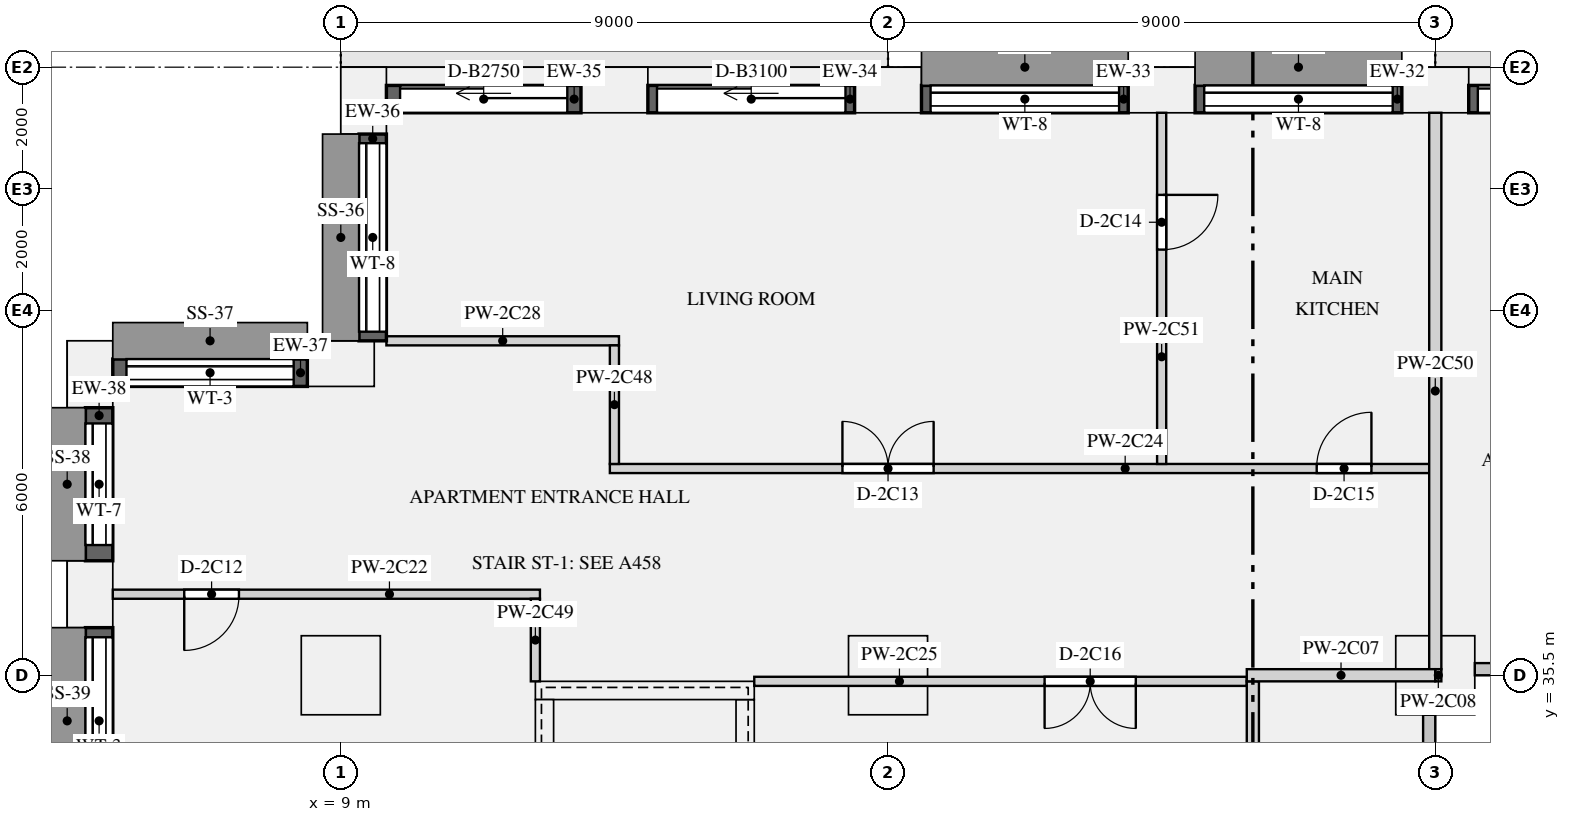
"""IFC4 building model, lengths in metres.
Left out: names, types, materials, properties, quantities, classifications, styles, units other than length and angle.
Written with IfcOpenShell. Run it as: python <this file> out.ifc"""

import sys

from ifc_helpers import new_model, si_unit, direction, frame, frame_2d, origin, origin_2d, place, context, subcontext, project, spatial, rectangle, extrude, element, fill, save


model = new_model("IFC4")
c1 = context("Model", 3, precision=1e-05, world=origin(), true_north=direction((0.0, 1.0)))
c2 = subcontext(c1, "Body", "Model", "MODEL_VIEW")
j1 = project(units=[si_unit("LENGTHUNIT", "METRE"), si_unit("PLANEANGLEUNIT", "RADIAN")], contexts=[c1])
p1 = place(None, origin())
s1 = spatial("IfcSite", under=j1, at=p1, CompositionType="ELEMENT")
p2 = place(p1, origin())
s2 = spatial("IfcBuilding", under=s1, at=p2, CompositionType="ELEMENT")
p3 = place(p2, frame((0.0, 0.0, 102.45)))
s3 = spatial("IfcBuildingStorey", under=s2, at=p3, CompositionType="ELEMENT", Elevation=102.45)
for number, where, z_axis, x_axis in (
    (1, (27.0, 45.125, 0.0), (0.0, 0.0, 1.0), (-1.0, 0.0, 0.0)),
    (2, (22.5, 45.125, 0.0), (0.0, 0.0, 1.0), (-1.0, 0.0, 0.0)),
    (3, (18.0, 45.125, 0.0), (0.0, 0.0, 1.0), (-1.0, 0.0, 0.0)),
    (4, (13.5, 45.125, 0.0), (0.0, 0.0, 1.0), (-1.0, 0.0, 0.0)),
    (5, (9.375, 44.95, 0.0), (0.0, 0.0, 1.0), (0.0, -1.0, 0.0)),
    (6, (9.0, 40.625, 0.0), (0.0, 0.0, 1.0), (-1.0, 0.0, 0.0)),
    (7, (4.875, 40.45, 0.0), (0.0, 0.0, 1.0), (0.0, -1.0, 0.0)),
    (8, (4.875, 36.833, 0.0), (0.0, 0.0, 1.0), (0.0, -1.0, 0.0)),
):
    element("IfcColumn", number, at=place(p3, frame(where, z_axis=z_axis, x_axis=x_axis)), inside=s3, PredefinedType="USERDEFINED", context=c2, shape_type="SweptSolid", body=[
        extrude(rectangle(XDim=1.1, YDim=0.75, at=origin_2d()), origin(), (0.0, 0.0, 1.0), 3.15),
    ])
for number, where, z_axis, x_axis in (
    (9, (9.0, 35.5, 0.0), (0.0, 0.0, 1.0), (1.0, 0.0, 0.0)),
    (10, (18.0, 35.5, 0.0), (0.0, 0.0, 1.0), (1.0, 0.0, 0.0)),
    (11, (27.0, 35.5, 0.0), (0.0, 0.0, 1.0), (1.0, 0.0, 0.0)),
):
    element("IfcColumn", number, at=place(p3, frame(where, z_axis=z_axis, x_axis=x_axis)), inside=s3, PredefinedType="COLUMN", context=c2, shape_type="SweptSolid", body=[
        extrude(rectangle(XDim=1.3, YDim=1.3, at=origin_2d()), origin(), (0.0, 0.0, 1.0), 3.15),
    ])
p4 = place(p3, frame((12.2, 35.25, 0.0), z_axis=(0.0, 0.0, 1.0), x_axis=(1.0, 0.0, 0.0)))
e12 = element("IfcWall", 12, at=p4, inside=s3, PredefinedType="SHEAR", context=c2, shape_type="SweptSolid", body=[
    extrude(rectangle(XDim=3.6, YDim=0.3, at=frame_2d((1.8, 0.0))), origin(), (0.0, 0.0, 1.0), 3.15),
])
for number, where, z_axis, x_axis in (
    (13, (12.35, 27.3, 0.0), (0.0, 0.0, 1.0), (0.0, 1.0, 0.0)),
    (14, (15.65, 27.3, 0.0), (0.0, 0.0, 1.0), (0.0, 1.0, 0.0)),
):
    element("IfcWall", number, at=place(p3, frame(where, z_axis=z_axis, x_axis=x_axis)), inside=s3, PredefinedType="SHEAR", context=c2, shape_type="SweptSolid", body=[
        extrude(rectangle(XDim=7.8, YDim=0.3, at=frame_2d((3.9, 0.0))), origin(), (0.0, 0.0, 1.0), 3.15),
    ])
p5 = place(p3, frame((30.95, 44.975, 0.0), z_axis=(0.0, 0.0, 1.0), x_axis=(-1.0, 0.0, 0.0)))
e15 = element("IfcWall", 15, at=p5, inside=s3, PredefinedType="SOLIDWALL", context=c2, shape_type="SweptSolid", body=[
    extrude(rectangle(XDim=3.4, YDim=0.45, at=frame_2d((1.7, 0.0))), origin(), (0.0, 0.0, 1.0), 2.83),
])
p6 = place(p5, frame((0.15, 0.0, 0.0)))
e16 = element("IfcOpeningElement", 16, at=p6, cuts=e15, PredefinedType="OPENING", context=c2, shape_type="SweptSolid", body=[
    extrude(rectangle(XDim=3.1, YDim=2.3, at=frame_2d((1.55, 1.15))), frame((0.0, 0.235, 0.0), z_axis=(0.0, -1.0, 0.0), x_axis=(1.0, 0.0, 0.0)), (0.0, 0.0, 1.0), 0.47),
])
p7 = place(p3, frame((26.45, 44.975, 0.9), z_axis=(0.0, 0.0, 1.0), x_axis=(-1.0, 0.0, 0.0)))
e17 = element("IfcWall", 17, at=p7, inside=s3, PredefinedType="SOLIDWALL", context=c2, shape_type="SweptSolid", body=[
    extrude(rectangle(XDim=3.4, YDim=0.45, at=frame_2d((1.7, 0.0))), origin(), (0.0, 0.0, 1.0), 1.93),
])
p8 = place(p7, frame((0.15, 0.0, 0.15)))
e18 = element("IfcOpeningElement", 18, at=p8, cuts=e17, PredefinedType="OPENING", context=c2, shape_type="SweptSolid", body=[
    extrude(rectangle(XDim=3.1, YDim=1.5, at=frame_2d((1.55, 0.75))), frame((0.0, 0.235, 0.0), z_axis=(0.0, -1.0, 0.0), x_axis=(1.0, 0.0, 0.0)), (0.0, 0.0, 1.0), 0.47),
])
p9 = place(p3, frame((21.95, 44.975, 0.9), z_axis=(0.0, 0.0, 1.0), x_axis=(-1.0, 0.0, 0.0)))
e19 = element("IfcWall", 19, at=p9, inside=s3, PredefinedType="SOLIDWALL", context=c2, shape_type="SweptSolid", body=[
    extrude(rectangle(XDim=3.4, YDim=0.45, at=frame_2d((1.7, 0.0))), origin(), (0.0, 0.0, 1.0), 1.93),
])
p10 = place(p9, frame((0.15, 0.0, 0.15)))
e20 = element("IfcOpeningElement", 20, at=p10, cuts=e19, PredefinedType="OPENING", context=c2, shape_type="SweptSolid", body=[
    extrude(rectangle(XDim=3.1, YDim=1.5, at=frame_2d((1.55, 0.75))), frame((0.0, 0.235, 0.0), z_axis=(0.0, -1.0, 0.0), x_axis=(1.0, 0.0, 0.0)), (0.0, 0.0, 1.0), 0.47),
])
p11 = place(p3, frame((17.45, 44.975, 0.0), z_axis=(0.0, 0.0, 1.0), x_axis=(-1.0, 0.0, 0.0)))
e21 = element("IfcWall", 21, at=p11, inside=s3, PredefinedType="SOLIDWALL", context=c2, shape_type="SweptSolid", body=[
    extrude(rectangle(XDim=3.4, YDim=0.45, at=frame_2d((1.7, 0.0))), origin(), (0.0, 0.0, 1.0), 2.83),
])
p12 = place(p11, frame((0.15, 0.0, 0.0)))
e22 = element("IfcOpeningElement", 22, at=p12, cuts=e21, PredefinedType="OPENING", context=c2, shape_type="SweptSolid", body=[
    extrude(rectangle(XDim=3.1, YDim=2.3, at=frame_2d((1.55, 1.15))), frame((0.0, 0.235, 0.0), z_axis=(0.0, -1.0, 0.0), x_axis=(1.0, 0.0, 0.0)), (0.0, 0.0, 1.0), 0.47),
])
p13 = place(p3, frame((12.95, 44.975, 0.0), z_axis=(0.0, 0.0, 1.0), x_axis=(-1.0, 0.0, 0.0)))
e23 = element("IfcWall", 23, at=p13, inside=s3, PredefinedType="SOLIDWALL", context=c2, shape_type="SweptSolid", body=[
    extrude(rectangle(XDim=3.2, YDim=0.45, at=frame_2d((1.6, 0.0))), origin(), (0.0, 0.0, 1.0), 2.83),
])
p14 = place(p13, frame((0.225, 0.0, 0.0)))
e24 = element("IfcOpeningElement", 24, at=p14, cuts=e23, PredefinedType="OPENING", context=c2, shape_type="SweptSolid", body=[
    extrude(rectangle(XDim=2.75, YDim=2.3, at=frame_2d((1.375, 1.15))), frame((0.0, 0.235, 0.0), z_axis=(0.0, -1.0, 0.0), x_axis=(1.0, 0.0, 0.0)), (0.0, 0.0, 1.0), 0.47),
])
p15 = place(p3, frame((9.525, 44.4, 0.9), z_axis=(0.0, 0.0, 1.0), x_axis=(0.0, -1.0, 0.0)))
e25 = element("IfcWall", 25, at=p15, inside=s3, PredefinedType="SOLIDWALL", context=c2, shape_type="SweptSolid", body=[
    extrude(rectangle(XDim=3.4, YDim=0.45, at=frame_2d((1.7, 0.0))), origin(), (0.0, 0.0, 1.0), 1.93),
])
p16 = place(p15, frame((0.15, 0.0, 0.15)))
e26 = element("IfcOpeningElement", 26, at=p16, cuts=e25, PredefinedType="OPENING", context=c2, shape_type="SweptSolid", body=[
    extrude(rectangle(XDim=3.1, YDim=1.5, at=frame_2d((1.55, 0.75))), frame((0.0, 0.235, 0.0), z_axis=(0.0, -1.0, 0.0), x_axis=(1.0, 0.0, 0.0)), (0.0, 0.0, 1.0), 0.47),
])
p17 = place(p3, frame((8.45, 40.475, 0.9), z_axis=(0.0, 0.0, 1.0), x_axis=(-1.0, 0.0, 0.0)))
e27 = element("IfcWall", 27, at=p17, inside=s3, PredefinedType="SOLIDWALL", context=c2, shape_type="SweptSolid", body=[
    extrude(rectangle(XDim=3.2, YDim=0.45, at=frame_2d((1.6, 0.0))), origin(), (0.0, 0.0, 1.0), 1.93),
])
p18 = place(p17, frame((0.225, 0.0, 0.15)))
e28 = element("IfcOpeningElement", 28, at=p18, cuts=e27, PredefinedType="OPENING", context=c2, shape_type="SweptSolid", body=[
    extrude(rectangle(XDim=2.75, YDim=1.5, at=frame_2d((1.375, 0.75))), frame((0.0, 0.235, 0.0), z_axis=(0.0, -1.0, 0.0), x_axis=(1.0, 0.0, 0.0)), (0.0, 0.0, 1.0), 0.47),
])
p19 = place(p3, frame((5.025, 39.9, 0.9), z_axis=(0.0, 0.0, 1.0), x_axis=(0.0, -1.0, 0.0)))
e29 = element("IfcWall", 29, at=p19, inside=s3, PredefinedType="SOLIDWALL", context=c2, shape_type="SweptSolid", body=[
    extrude(rectangle(XDim=2.517, YDim=0.45, at=frame_2d((1.258, 0.0))), origin(), (0.0, 0.0, 1.0), 1.93),
])
p20 = place(p19, frame((0.259, 0.0, 0.15)))
e30 = element("IfcOpeningElement", 30, at=p20, cuts=e29, PredefinedType="OPENING", context=c2, shape_type="SweptSolid", body=[
    extrude(rectangle(XDim=2.0, YDim=1.5, at=frame_2d((1.0, 0.75))), frame((0.0, 0.235, 0.0), z_axis=(0.0, -1.0, 0.0), x_axis=(1.0, 0.0, 0.0)), (0.0, 0.0, 1.0), 0.47),
])
p21 = place(p3, frame((5.025, 36.283, 0.9), z_axis=(0.0, 0.0, 1.0), x_axis=(0.0, -1.0, 0.0)))
e31 = element("IfcWall", 31, at=p21, inside=s3, PredefinedType="SOLIDWALL", context=c2, shape_type="SweptSolid", body=[
    extrude(rectangle(XDim=3.066, YDim=0.45, at=frame_2d((1.533, 0.0))), origin(), (0.0, 0.0, 1.0), 1.93),
])
p22 = place(p21, frame((0.158, 0.0, 0.15)))
e32 = element("IfcOpeningElement", 32, at=p22, cuts=e31, PredefinedType="OPENING", context=c2, shape_type="SweptSolid", body=[
    extrude(rectangle(XDim=2.75, YDim=1.5, at=frame_2d((1.375, 0.75))), frame((0.0, 0.235, 0.0), z_axis=(0.0, -1.0, 0.0), x_axis=(1.0, 0.0, 0.0)), (0.0, 0.0, 1.0), 0.47),
])
p23 = place(p3, frame((23.9, 35.5, 0.0), z_axis=(0.0, 0.0, 1.0), x_axis=(1.0, 0.0, 0.0)))
e33 = element("IfcWall", 33, at=p23, inside=s3, PredefinedType="PARTITIONING", context=c2, shape_type="SweptSolid", body=[
    extrude(rectangle(XDim=3.1, YDim=0.2, at=frame_2d((1.55, 0.0))), origin(), (0.0, 0.0, 1.0), 2.83),
])
p24 = place(p3, frame((27.0, 35.5, 0.0), z_axis=(0.0, 0.0, 1.0), x_axis=(1.0, 0.0, 0.0)))
e34 = element("IfcWall", 34, at=p24, inside=s3, PredefinedType="PARTITIONING", context=c2, shape_type="SweptSolid", body=[
    extrude(rectangle(XDim=0.1, YDim=0.2, at=frame_2d((0.05, 0.0))), origin(), (0.0, 0.0, 1.0), 2.83),
])
p25 = place(p3, frame((5.25, 36.833, 0.0), z_axis=(0.0, 0.0, 1.0), x_axis=(1.0, 0.0, 0.0)))
e35 = element("IfcWall", 35, at=p25, inside=s3, PredefinedType="PARTITIONING", context=c2, shape_type="SweptSolid", body=[
    extrude(rectangle(XDim=7.025, YDim=0.15, at=frame_2d((3.512, 0.0))), origin(), (0.0, 0.0, 1.0), 2.83),
])
p26 = place(p25, frame((1.175, 0.0, 0.0)))
e36 = element("IfcOpeningElement", 36, at=p26, cuts=e35, PredefinedType="OPENING", context=c2, shape_type="SweptSolid", body=[
    extrude(rectangle(XDim=0.9, YDim=2.1, at=frame_2d((0.45, 1.05))), frame((0.0, 0.085, 0.0), z_axis=(0.0, -1.0, 0.0), x_axis=(1.0, 0.0, 0.0)), (0.0, 0.0, 1.0), 0.17),
])
p27 = place(p3, frame((13.425, 38.9, 0.0), z_axis=(0.0, 0.0, 1.0), x_axis=(1.0, 0.0, 0.0)))
e37 = element("IfcWall", 37, at=p27, inside=s3, PredefinedType="PARTITIONING", context=c2, shape_type="SweptSolid", body=[
    extrude(rectangle(XDim=13.475, YDim=0.15, at=frame_2d((6.737, 0.0))), origin(), (0.0, 0.0, 1.0), 2.83),
])
p28 = place(p27, frame((3.825, 0.0, 0.0)))
e38 = element("IfcOpeningElement", 38, at=p28, cuts=e37, PredefinedType="OPENING", context=c2, shape_type="SweptSolid", body=[
    extrude(rectangle(XDim=1.5, YDim=2.1, at=frame_2d((0.75, 1.05))), frame((0.0, 0.085, 0.0), z_axis=(0.0, -1.0, 0.0), x_axis=(1.0, 0.0, 0.0)), (0.0, 0.0, 1.0), 0.17),
])
p29 = place(p27, frame((11.625, 0.0, 0.0)))
e39 = element("IfcOpeningElement", 39, at=p29, cuts=e37, PredefinedType="OPENING", context=c2, shape_type="SweptSolid", body=[
    extrude(rectangle(XDim=0.9, YDim=2.1, at=frame_2d((0.45, 1.05))), frame((0.0, 0.085, 0.0), z_axis=(0.0, -1.0, 0.0), x_axis=(1.0, 0.0, 0.0)), (0.0, 0.0, 1.0), 0.17),
])
p30 = place(p3, frame((15.8, 35.4, 0.0), z_axis=(0.0, 0.0, 1.0), x_axis=(1.0, 0.0, 0.0)))
e40 = element("IfcWall", 40, at=p30, inside=s3, PredefinedType="PARTITIONING", context=c2, shape_type="SweptSolid", body=[
    extrude(rectangle(XDim=8.1, YDim=0.15, at=frame_2d((4.05, 0.0))), origin(), (0.0, 0.0, 1.0), 2.83),
])
p31 = place(p30, frame((4.775, 0.0, 0.0)))
e41 = element("IfcOpeningElement", 41, at=p31, cuts=e40, PredefinedType="OPENING", context=c2, shape_type="SweptSolid", body=[
    extrude(rectangle(XDim=1.5, YDim=2.1, at=frame_2d((0.75, 1.05))), frame((0.0, 0.085, 0.0), z_axis=(0.0, -1.0, 0.0), x_axis=(1.0, 0.0, 0.0)), (0.0, 0.0, 1.0), 0.17),
])
p32 = place(p3, frame((9.75, 41.0, 0.0), z_axis=(0.0, 0.0, 1.0), x_axis=(1.0, 0.0, 0.0)))
e42 = element("IfcWall", 42, at=p32, inside=s3, PredefinedType="PARTITIONING", context=c2, shape_type="SweptSolid", body=[
    extrude(rectangle(XDim=3.825, YDim=0.15, at=frame_2d((1.913, 0.0))), origin(), (0.0, 0.0, 1.0), 2.83),
])
p33 = place(p3, frame((24.0, 27.1, 0.0), z_axis=(0.0, 0.0, 1.0), x_axis=(0.0, 1.0, 0.0)))
e43 = element("IfcWall", 43, at=p33, inside=s3, PredefinedType="PARTITIONING", context=c2, shape_type="SweptSolid", body=[
    extrude(rectangle(XDim=8.3, YDim=0.2, at=frame_2d((4.15, 0.0))), origin(), (0.0, 0.0, 1.0), 2.83),
])
p34 = place(p3, frame((13.5, 38.975, 0.0), z_axis=(0.0, 0.0, 1.0), x_axis=(0.0, 1.0, 0.0)))
e44 = element("IfcWall", 44, at=p34, inside=s3, PredefinedType="PARTITIONING", context=c2, shape_type="SweptSolid", body=[
    extrude(rectangle(XDim=1.95, YDim=0.15, at=frame_2d((0.975, 0.0))), origin(), (0.0, 0.0, 1.0), 2.83),
])
p35 = place(p3, frame((12.2, 35.4, 0.0), z_axis=(0.0, 0.0, 1.0), x_axis=(0.0, 1.0, 0.0)))
e45 = element("IfcWall", 45, at=p35, inside=s3, PredefinedType="PARTITIONING", context=c2, shape_type="SweptSolid", body=[
    extrude(rectangle(XDim=1.358, YDim=0.15, at=frame_2d((0.679, 0.0))), origin(), (0.0, 0.0, 1.0), 2.83),
])
p36 = place(p3, frame((27.0, 35.6, 0.0), z_axis=(0.0, 0.0, 1.0), x_axis=(0.0, 1.0, 0.0)))
e46 = element("IfcWall", 46, at=p36, inside=s3, PredefinedType="PARTITIONING", context=c2, shape_type="SweptSolid", body=[
    extrude(rectangle(XDim=9.15, YDim=0.2, at=frame_2d((4.575, 0.0))), origin(), (0.0, 0.0, 1.0), 2.83),
])
p37 = place(p3, frame((22.5, 38.975, 0.0), z_axis=(0.0, 0.0, 1.0), x_axis=(0.0, 1.0, 0.0)))
e47 = element("IfcWall", 47, at=p37, inside=s3, PredefinedType="PARTITIONING", context=c2, shape_type="SweptSolid", body=[
    extrude(rectangle(XDim=5.775, YDim=0.15, at=frame_2d((2.887, 0.0))), origin(), (0.0, 0.0, 1.0), 2.83),
])
p38 = place(p37, frame((3.525, 0.0, 0.0)))
e48 = element("IfcOpeningElement", 48, at=p38, cuts=e47, PredefinedType="OPENING", context=c2, shape_type="SweptSolid", body=[
    extrude(rectangle(XDim=0.9, YDim=2.1, at=frame_2d((0.45, 1.05))), frame((0.0, 0.085, 0.0), z_axis=(0.0, -1.0, 0.0), x_axis=(1.0, 0.0, 0.0)), (0.0, 0.0, 1.0), 0.17),
])
p39 = place(p6, origin())
e49 = element("IfcDoor", 49, at=p39, inside=s3, OperationType="SLIDING_TO_LEFT", PredefinedType="DOOR", context=c2, shape_type="SweptSolid", body=[
    extrude(rectangle(XDim=3.1, YDim=2.3, at=frame_2d((1.55, 1.15))), frame((0.0, -0.07, 0.0), z_axis=(0.0, -1.0, 0.0), x_axis=(1.0, 0.0, 0.0)), (0.0, 0.0, 1.0), 0.05),
])
fill(e16, e49)
p40 = place(p8, origin())
e50 = element("IfcWindow", 50, at=p40, inside=s3, PartitioningType="SINGLE_PANEL", PredefinedType="WINDOW", context=c2, shape_type="SweptSolid", body=[
    extrude(rectangle(XDim=3.1, YDim=1.5, at=frame_2d((1.55, 0.75))), frame((0.0, -0.065, 0.0), z_axis=(0.0, -1.0, 0.0), x_axis=(1.0, 0.0, 0.0)), (0.0, 0.0, 1.0), 0.06),
])
fill(e18, e50)
p41 = place(p10, origin())
e51 = element("IfcWindow", 51, at=p41, inside=s3, PartitioningType="SINGLE_PANEL", PredefinedType="WINDOW", context=c2, shape_type="SweptSolid", body=[
    extrude(rectangle(XDim=3.1, YDim=1.5, at=frame_2d((1.55, 0.75))), frame((0.0, -0.065, 0.0), z_axis=(0.0, -1.0, 0.0), x_axis=(1.0, 0.0, 0.0)), (0.0, 0.0, 1.0), 0.06),
])
fill(e20, e51)
p42 = place(p12, origin())
e52 = element("IfcDoor", 52, at=p42, inside=s3, OperationType="SLIDING_TO_LEFT", PredefinedType="DOOR", context=c2, shape_type="SweptSolid", body=[
    extrude(rectangle(XDim=3.1, YDim=2.3, at=frame_2d((1.55, 1.15))), frame((0.0, -0.07, 0.0), z_axis=(0.0, -1.0, 0.0), x_axis=(1.0, 0.0, 0.0)), (0.0, 0.0, 1.0), 0.05),
])
fill(e22, e52)
p43 = place(p14, origin())
e53 = element("IfcDoor", 53, at=p43, inside=s3, OperationType="SLIDING_TO_LEFT", PredefinedType="DOOR", context=c2, shape_type="SweptSolid", body=[
    extrude(rectangle(XDim=2.75, YDim=2.3, at=frame_2d((1.375, 1.15))), frame((0.0, -0.07, 0.0), z_axis=(0.0, -1.0, 0.0), x_axis=(1.0, 0.0, 0.0)), (0.0, 0.0, 1.0), 0.05),
])
fill(e24, e53)
p44 = place(p16, origin())
e54 = element("IfcWindow", 54, at=p44, inside=s3, PartitioningType="SINGLE_PANEL", PredefinedType="WINDOW", context=c2, shape_type="SweptSolid", body=[
    extrude(rectangle(XDim=3.1, YDim=1.5, at=frame_2d((1.55, 0.75))), frame((0.0, -0.065, 0.0), z_axis=(0.0, -1.0, 0.0), x_axis=(1.0, 0.0, 0.0)), (0.0, 0.0, 1.0), 0.06),
])
fill(e26, e54)
p45 = place(p18, origin())
e55 = element("IfcWindow", 55, at=p45, inside=s3, PartitioningType="SINGLE_PANEL", PredefinedType="WINDOW", context=c2, shape_type="SweptSolid", body=[
    extrude(rectangle(XDim=2.75, YDim=1.5, at=frame_2d((1.375, 0.75))), frame((0.0, -0.065, 0.0), z_axis=(0.0, -1.0, 0.0), x_axis=(1.0, 0.0, 0.0)), (0.0, 0.0, 1.0), 0.06),
])
fill(e28, e55)
p46 = place(p20, origin())
e56 = element("IfcWindow", 56, at=p46, inside=s3, PartitioningType="SINGLE_PANEL", PredefinedType="WINDOW", context=c2, shape_type="SweptSolid", body=[
    extrude(rectangle(XDim=2.0, YDim=1.5, at=frame_2d((1.0, 0.75))), frame((0.0, -0.065, 0.0), z_axis=(0.0, -1.0, 0.0), x_axis=(1.0, 0.0, 0.0)), (0.0, 0.0, 1.0), 0.06),
])
fill(e30, e56)
p47 = place(p22, origin())
e57 = element("IfcWindow", 57, at=p47, inside=s3, PartitioningType="SINGLE_PANEL", PredefinedType="WINDOW", context=c2, shape_type="SweptSolid", body=[
    extrude(rectangle(XDim=2.75, YDim=1.5, at=frame_2d((1.375, 0.75))), frame((0.0, -0.065, 0.0), z_axis=(0.0, -1.0, 0.0), x_axis=(1.0, 0.0, 0.0)), (0.0, 0.0, 1.0), 0.06),
])
fill(e32, e57)
p48 = place(p26, frame((0.9, 0.0, 0.0), z_axis=(0.0, 0.0, 1.0), x_axis=(-1.0, 0.0, 0.0)))
e58 = element("IfcDoor", 58, at=p48, inside=s3, OperationType="SINGLE_SWING_RIGHT", PredefinedType="DOOR", context=c2, shape_type="SweptSolid", body=[
    extrude(rectangle(XDim=0.9, YDim=2.1, at=frame_2d((0.45, 1.05))), frame((0.0, 0.025, 0.0), z_axis=(0.0, -1.0, 0.0), x_axis=(1.0, 0.0, 0.0)), (0.0, 0.0, 1.0), 0.05),
])
fill(e36, e58)
p49 = place(p28, origin())
e59 = element("IfcDoor", 59, at=p49, inside=s3, OperationType="DOUBLE_DOOR_SINGLE_SWING", PredefinedType="DOOR", context=c2, shape_type="SweptSolid", body=[
    extrude(rectangle(XDim=1.5, YDim=2.1, at=frame_2d((0.75, 1.05))), frame((0.0, 0.025, 0.0), z_axis=(0.0, -1.0, 0.0), x_axis=(1.0, 0.0, 0.0)), (0.0, 0.0, 1.0), 0.05),
])
fill(e38, e59)
p50 = place(p38, frame((0.9, 0.0, 0.0), z_axis=(0.0, 0.0, 1.0), x_axis=(-1.0, 0.0, 0.0)))
e60 = element("IfcDoor", 60, at=p50, inside=s3, OperationType="SINGLE_SWING_LEFT", PredefinedType="DOOR", context=c2, shape_type="SweptSolid", body=[
    extrude(rectangle(XDim=0.9, YDim=2.1, at=frame_2d((0.45, 1.05))), frame((0.0, 0.025, 0.0), z_axis=(0.0, -1.0, 0.0), x_axis=(1.0, 0.0, 0.0)), (0.0, 0.0, 1.0), 0.05),
])
fill(e48, e60)
p51 = place(p29, origin())
e61 = element("IfcDoor", 61, at=p51, inside=s3, OperationType="SINGLE_SWING_RIGHT", PredefinedType="DOOR", context=c2, shape_type="SweptSolid", body=[
    extrude(rectangle(XDim=0.9, YDim=2.1, at=frame_2d((0.45, 1.05))), frame((0.0, 0.025, 0.0), z_axis=(0.0, -1.0, 0.0), x_axis=(1.0, 0.0, 0.0)), (0.0, 0.0, 1.0), 0.05),
])
fill(e39, e61)
p52 = place(p31, frame((1.5, 0.0, 0.0), z_axis=(0.0, 0.0, 1.0), x_axis=(-1.0, 0.0, 0.0)))
e62 = element("IfcDoor", 62, at=p52, inside=s3, OperationType="DOUBLE_DOOR_SINGLE_SWING", PredefinedType="DOOR", context=c2, shape_type="SweptSolid", body=[
    extrude(rectangle(XDim=1.5, YDim=2.1, at=frame_2d((0.75, 1.05))), frame((0.0, 0.025, 0.0), z_axis=(0.0, -1.0, 0.0), x_axis=(1.0, 0.0, 0.0)), (0.0, 0.0, 1.0), 0.05),
])
fill(e41, e62)
save(model, sys.argv[1])
